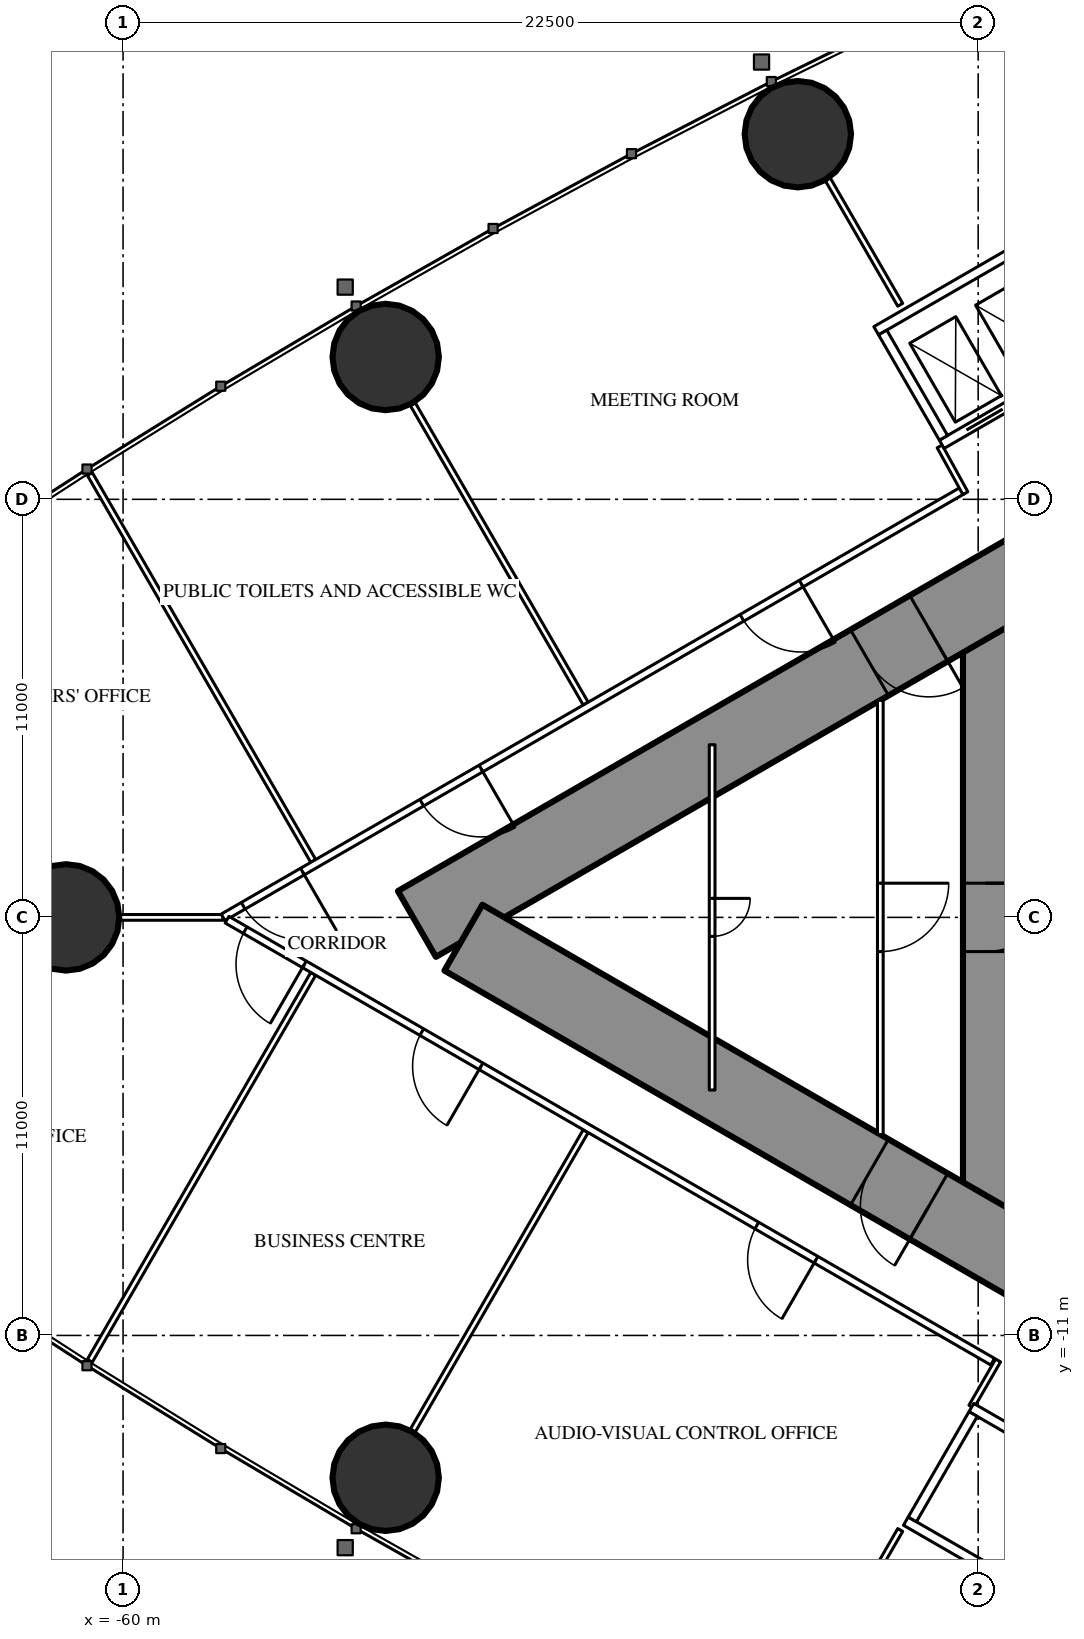
"""IFC4 building model, lengths in metres.
Left out: names, types, materials, properties, quantities, classifications, styles, units other than length and angle.
Written with IfcOpenShell. Run it as: python <this file> out.ifc"""

import sys

from ifc_helpers import new_model, si_unit, direction, frame, frame_2d, origin, origin_2d, place, context, subcontext, project, spatial, rectangle, hollow_circle, extrude, element, fill, save


model = new_model("IFC4")
c1 = context("Model", 3, precision=1e-05, world=origin(), true_north=direction((0.0, 1.0)))
c2 = subcontext(c1, "Body", "Model", "MODEL_VIEW")
j1 = project(units=[si_unit("LENGTHUNIT", "METRE"), si_unit("PLANEANGLEUNIT", "RADIAN")], contexts=[c1])
p1 = place(None, origin())
s1 = spatial("IfcSite", under=j1, at=p1, CompositionType="ELEMENT")
p2 = place(p1, origin())
s2 = spatial("IfcBuilding", under=s1, at=p2, CompositionType="ELEMENT")
p3 = place(p2, frame((0.0, 0.0, 7.2)))
s3 = spatial("IfcBuildingStorey", under=s2, at=p3, CompositionType="ELEMENT", Elevation=7.2)
for number, where, z_axis, x_axis in (
    (1, (-53.09, -14.745, 0.0), (0.0, 0.0, 1.0), (1.0, 0.0, 0.0)),
    (2, (-42.245, 20.607, 0.0), (0.0, 0.0, 1.0), (1.0, 0.0, 0.0)),
    (3, (-53.09, 14.745, 0.0), (0.0, 0.0, 1.0), (1.0, 0.0, 0.0)),
):
    element("IfcColumn", number, at=place(p3, frame(where, z_axis=z_axis, x_axis=x_axis)), inside=s3, PredefinedType="COLUMN", context=c2, shape_type="SweptSolid", body=[
        extrude(hollow_circle(Radius=1.4, WallThickness=0.12, at=origin_2d()), origin(), (0.0, 0.0, 1.0), 5.4),
    ])
p4 = place(p3, frame((-61.5, 0.0, 0.0), z_axis=(0.0, 0.0, 1.0), x_axis=(1.0, 0.0, 0.0)))
e4 = element("IfcColumn", 4, at=p4, inside=s3, PredefinedType="COLUMN", context=c2, shape_type="SweptSolid", body=[
    extrude(hollow_circle(Radius=1.4, WallThickness=0.1, at=origin_2d()), origin(), (0.0, 0.0, 1.0), 5.4),
])
p5 = place(p3, frame((-37.3, 8.6, 0.0), z_axis=(0.0, 0.0, 1.0), x_axis=(0.0, -1.0, 0.0)))
e5 = element("IfcWall", 5, at=p5, inside=s3, PredefinedType="SHEAR", context=c2, shape_type="SweptSolid", body=[
    extrude(rectangle(XDim=17.2, YDim=1.2, at=frame_2d((8.6, 0.0))), origin(), (0.0, 0.0, 1.0), 5.4),
])
p6 = place(p5, frame((7.7, 0.0, 0.0)))
e6 = element("IfcOpeningElement", 6, at=p6, cuts=e5, PredefinedType="OPENING", context=c2, shape_type="SweptSolid", body=[
    extrude(rectangle(XDim=1.8, YDim=2.2, at=frame_2d((0.9, 1.1))), frame((0.0, 0.61, 0.0), z_axis=(0.0, -1.0, 0.0), x_axis=(1.0, 0.0, 0.0)), (0.0, 0.0, 1.0), 1.22),
])
p7 = place(p3, frame((-27.2, 14.3, 0.0), z_axis=(0.0, 0.0, 1.0), x_axis=(-0.866026593062, -0.499997940104, 0.0)))
e7 = element("IfcWall", 7, at=p7, inside=s3, PredefinedType="SHEAR", context=c2, shape_type="SweptSolid", body=[
    extrude(rectangle(XDim=28.946, YDim=2.0, at=frame_2d((14.473, 0.0))), origin(), (0.0, 0.0, 1.0), 5.4),
])
p8 = place(p7, frame((4.6, 0.0, 0.0)))
e8 = element("IfcOpeningElement", 8, at=p8, cuts=e7, PredefinedType="OPENING", context=c2, shape_type="SweptSolid", body=[
    extrude(rectangle(XDim=1.0, YDim=2.2, at=frame_2d((0.5, 1.1))), frame((0.0, 1.01, 0.0), z_axis=(0.0, -1.0, 0.0), x_axis=(1.0, 0.0, 0.0)), (0.0, 0.0, 1.0), 2.02),
])
p9 = place(p7, frame((13.395, 0.0, 0.0)))
e9 = element("IfcOpeningElement", 9, at=p9, cuts=e7, PredefinedType="OPENING", context=c2, shape_type="SweptSolid", body=[
    extrude(rectangle(XDim=1.8, YDim=2.2, at=frame_2d((0.9, 1.1))), frame((0.0, 1.01, 0.0), z_axis=(0.0, -1.0, 0.0), x_axis=(1.0, 0.0, 0.0)), (0.0, 0.0, 1.0), 2.02),
])
p10 = place(p3, frame((-27.2, -14.3, 0.0), z_axis=(0.0, 0.0, 1.0), x_axis=(-0.866024044937, 0.500002353585, 0.0)))
e10 = element("IfcWall", 10, at=p10, inside=s3, PredefinedType="SHEAR", context=c2, shape_type="SweptSolid", body=[
    extrude(rectangle(XDim=27.533, YDim=2.0, at=frame_2d((13.767, 0.0))), origin(), (0.0, 0.0, 1.0), 5.4),
])
p11 = place(p10, frame((4.6, 0.0, 0.0)))
e11 = element("IfcOpeningElement", 11, at=p11, cuts=e10, PredefinedType="OPENING", context=c2, shape_type="SweptSolid", body=[
    extrude(rectangle(XDim=1.0, YDim=2.2, at=frame_2d((0.5, 1.1))), frame((0.0, 1.01, 0.0), z_axis=(0.0, -1.0, 0.0), x_axis=(1.0, 0.0, 0.0)), (0.0, 0.0, 1.0), 2.02),
])
p12 = place(p10, frame((13.395, 0.0, 0.0)))
e12 = element("IfcOpeningElement", 12, at=p12, cuts=e10, PredefinedType="OPENING", context=c2, shape_type="SweptSolid", body=[
    extrude(rectangle(XDim=1.8, YDim=2.2, at=frame_2d((0.9, 1.1))), frame((0.0, 1.01, 0.0), z_axis=(0.0, -1.0, 0.0), x_axis=(1.0, 0.0, 0.0)), (0.0, 0.0, 1.0), 2.02),
])
p13 = place(p3, frame((-47.827, 5.624, 0.0), z_axis=(0.0, 0.0, 1.0), x_axis=(-0.499995404498, 0.866028056982, 0.0)))
e13 = element("IfcWall", 13, at=p13, inside=s3, PredefinedType="PARTITIONING", context=c2, shape_type="SweptSolid", body=[
    extrude(rectangle(XDim=9.11, YDim=0.15, at=frame_2d((4.555, 0.0))), origin(), (0.0, 0.0, 1.0), 4.05),
])
p14 = place(p3, frame((-54.996, 1.485, 0.0), z_axis=(0.0, 0.0, 1.0), x_axis=(-0.500002871521, 0.866023745905, 0.0)))
e14 = element("IfcWall", 14, at=p14, inside=s3, PredefinedType="PARTITIONING", context=c2, shape_type="SweptSolid", body=[
    extrude(rectangle(XDim=11.757, YDim=0.15, at=frame_2d((5.878, 0.0))), origin(), (0.0, 0.0, 1.0), 5.05),
])
p15 = place(p3, frame((-47.827, -5.624, 0.0), z_axis=(0.0, 0.0, 1.0), x_axis=(-0.499995404498, -0.866028056982, 0.0)))
e15 = element("IfcWall", 15, at=p15, inside=s3, PredefinedType="PARTITIONING", context=c2, shape_type="SweptSolid", body=[
    extrude(rectangle(XDim=9.11, YDim=0.15, at=frame_2d((4.555, 0.0))), origin(), (0.0, 0.0, 1.0), 4.05),
])
p16 = place(p3, frame((-54.996, -1.485, 0.0), z_axis=(0.0, 0.0, 1.0), x_axis=(-0.500002871521, -0.866023745905, 0.0)))
e16 = element("IfcWall", 16, at=p16, inside=s3, PredefinedType="PARTITIONING", context=c2, shape_type="SweptSolid", body=[
    extrude(rectangle(XDim=11.757, YDim=0.15, at=frame_2d((5.878, 0.0))), origin(), (0.0, 0.0, 1.0), 5.05),
])
p17 = place(p3, frame((-57.368, 0.0, 0.0), z_axis=(0.0, 0.0, 1.0), x_axis=(-1.0, 0.0, 0.0)))
e17 = element("IfcWall", 17, at=p17, inside=s3, PredefinedType="PARTITIONING", context=c2, shape_type="SweptSolid", body=[
    extrude(rectangle(XDim=15.447, YDim=0.15, at=frame_2d((7.724, 0.0))), origin(), (0.0, 0.0, 1.0), 4.05),
])
for number, where, z_axis, x_axis in (
    (18, (-39.551, 16.119, 0.0), (0.0, 0.0, 1.0), (-0.5, 0.866, 0.0)),
    (19, (-39.551, -16.118, 0.0), (0.0, 0.0, 1.0), (-0.5, -0.866, 0.0)),
):
    element("IfcWall", number, at=place(p3, frame(where, z_axis=z_axis, x_axis=x_axis)), inside=s3, PredefinedType="PARTITIONING", context=c2, shape_type="SweptSolid", body=[
        extrude(rectangle(XDim=3.815, YDim=0.15, at=frame_2d((1.907, 0.0))), origin(), (0.0, 0.0, 1.0), 5.05),
    ])
p18 = place(p3, frame((-37.9, 11.24, 0.0), z_axis=(0.0, 0.0, 1.0), x_axis=(-0.866022995118, -0.50000417191, 0.0)))
e20 = element("IfcWall", 20, at=p18, inside=s3, PredefinedType="PARTITIONING", context=c2, shape_type="SweptSolid", body=[
    extrude(rectangle(XDim=22.48, YDim=0.2, at=frame_2d((11.24, 0.0))), origin(), (0.0, 0.0, 1.0), 5.05),
])
p19 = place(p18, frame((14.644, 0.0, 0.0)))
e21 = element("IfcOpeningElement", 21, at=p19, cuts=e20, PredefinedType="OPENING", context=c2, shape_type="SweptSolid", body=[
    extrude(rectangle(XDim=1.8, YDim=2.2, at=frame_2d((0.9, 1.1))), frame((0.0, 0.11, 0.0), z_axis=(0.0, -1.0, 0.0), x_axis=(1.0, 0.0, 0.0)), (0.0, 0.0, 1.0), 0.22),
])
p20 = place(p18, frame((20.069, 0.0, 0.0)))
e22 = element("IfcOpeningElement", 22, at=p20, cuts=e20, PredefinedType="OPENING", context=c2, shape_type="SweptSolid", body=[
    extrude(rectangle(XDim=1.8, YDim=2.2, at=frame_2d((0.9, 1.1))), frame((0.0, 0.11, 0.0), z_axis=(0.0, -1.0, 0.0), x_axis=(1.0, 0.0, 0.0)), (0.0, 0.0, 1.0), 0.22),
])
p21 = place(p18, frame((4.915, 0.0, 0.0)))
e23 = element("IfcOpeningElement", 23, at=p21, cuts=e20, PredefinedType="OPENING", context=c2, shape_type="SweptSolid", body=[
    extrude(rectangle(XDim=1.8, YDim=2.2, at=frame_2d((0.9, 1.1))), frame((0.0, 0.11, 0.0), z_axis=(0.0, -1.0, 0.0), x_axis=(1.0, 0.0, 0.0)), (0.0, 0.0, 1.0), 0.22),
])
p22 = place(p3, frame((-37.12, -11.69, 0.0), z_axis=(0.0, 0.0, 1.0), x_axis=(-0.866028803602, 0.499994111297, 0.0)))
e24 = element("IfcWall", 24, at=p22, inside=s3, PredefinedType="PARTITIONING", context=c2, shape_type="SweptSolid", body=[
    extrude(rectangle(XDim=23.26, YDim=0.2, at=frame_2d((11.63, 0.0))), origin(), (0.0, 0.0, 1.0), 5.05),
])
p23 = place(p22, frame((20.909, 0.0, 0.0)))
e25 = element("IfcOpeningElement", 25, at=p23, cuts=e24, PredefinedType="OPENING", context=c2, shape_type="SweptSolid", body=[
    extrude(rectangle(XDim=1.8, YDim=2.2, at=frame_2d((0.9, 1.1))), frame((0.0, 0.11, 0.0), z_axis=(0.0, -1.0, 0.0), x_axis=(1.0, 0.0, 0.0)), (0.0, 0.0, 1.0), 0.22),
])
p24 = place(p22, frame((15.544, 0.0, 0.0)))
e26 = element("IfcOpeningElement", 26, at=p24, cuts=e24, PredefinedType="OPENING", context=c2, shape_type="SweptSolid", body=[
    extrude(rectangle(XDim=1.8, YDim=2.2, at=frame_2d((0.9, 1.1))), frame((0.0, 0.11, 0.0), z_axis=(0.0, -1.0, 0.0), x_axis=(1.0, 0.0, 0.0)), (0.0, 0.0, 1.0), 0.22),
])
p25 = place(p22, frame((5.365, 0.0, 0.0)))
e27 = element("IfcOpeningElement", 27, at=p25, cuts=e24, PredefinedType="OPENING", context=c2, shape_type="SweptSolid", body=[
    extrude(rectangle(XDim=1.8, YDim=2.2, at=frame_2d((0.9, 1.1))), frame((0.0, 0.11, 0.0), z_axis=(0.0, -1.0, 0.0), x_axis=(1.0, 0.0, 0.0)), (0.0, 0.0, 1.0), 0.22),
])
p26 = place(p3, frame((-36.976, -11.658, 0.0), z_axis=(0.0, 0.0, 1.0), x_axis=(-0.50008355685, -0.86597715684, 0.0)))
e28 = element("IfcWall", 28, at=p26, inside=s3, PredefinedType="PARTITIONING", context=c2, shape_type="SweptSolid", body=[
    extrude(rectangle(XDim=1.405, YDim=0.15, at=frame_2d((0.702, 0.0))), origin(), (0.0, 0.0, 1.0), 5.05),
])
p27 = place(p3, frame((-38.513, 12.392, 0.0), z_axis=(0.0, 0.0, 1.0), x_axis=(0.481358300093, -0.876523922624, 0.0)))
e29 = element("IfcWall", 29, at=p27, inside=s3, PredefinedType="PARTITIONING", context=c2, shape_type="SweptSolid", body=[
    extrude(rectangle(XDim=1.405, YDim=0.15, at=frame_2d((0.703, 0.0))), origin(), (0.0, 0.0, 1.0), 5.05),
])
p28 = place(p3, frame((-40.075, 5.712, 0.0), z_axis=(0.0, 0.0, 1.0), x_axis=(0.0, -1.0, 0.0)))
e30 = element("IfcWall", 30, at=p28, inside=s3, PredefinedType="PARTITIONING", context=c2, shape_type="SweptSolid", body=[
    extrude(rectangle(XDim=11.424, YDim=0.15, at=frame_2d((5.712, 0.0))), origin(), (0.0, 0.0, 1.0), 5.05),
])
p29 = place(p28, frame((4.812, 0.0, 0.0)))
e31 = element("IfcOpeningElement", 31, at=p29, cuts=e30, PredefinedType="OPENING", context=c2, shape_type="SweptSolid", body=[
    extrude(rectangle(XDim=1.8, YDim=2.2, at=frame_2d((0.9, 1.1))), frame((0.0, 0.085, 0.0), z_axis=(0.0, -1.0, 0.0), x_axis=(1.0, 0.0, 0.0)), (0.0, 0.0, 1.0), 0.17),
])
p30 = place(p3, frame((-44.5, 4.543, 0.0), z_axis=(0.0, 0.0, 1.0), x_axis=(0.0, -1.0, 0.0)))
e32 = element("IfcWall", 32, at=p30, inside=s3, PredefinedType="PARTITIONING", context=c2, shape_type="SweptSolid", body=[
    extrude(rectangle(XDim=9.085, YDim=0.15, at=frame_2d((4.543, 0.0))), origin(), (0.0, 0.0, 1.0), 5.05),
])
p31 = place(p30, frame((4.043, 0.0, 0.0)))
e33 = element("IfcOpeningElement", 33, at=p31, cuts=e32, PredefinedType="OPENING", context=c2, shape_type="SweptSolid", body=[
    extrude(rectangle(XDim=1.0, YDim=2.2, at=frame_2d((0.5, 1.1))), frame((0.0, 0.085, 0.0), z_axis=(0.0, -1.0, 0.0), x_axis=(1.0, 0.0, 0.0)), (0.0, 0.0, 1.0), 0.17),
])
p32 = place(p3, frame((-31.01, 16.747, 0.0), z_axis=(0.0, 0.0, 1.0), x_axis=(-0.866028165386, -0.499995216735, 0.0)))
e34 = element("IfcWall", 34, at=p32, inside=s3, PredefinedType="PARTITIONING", context=c2, shape_type="SweptSolid", body=[
    extrude(rectangle(XDim=8.6, YDim=0.25, at=frame_2d((4.3, 0.0))), origin(), (0.0, 0.0, 1.0), 5.05),
])
p33 = place(p32, frame((0.75, 0.0, 0.0)))
e35 = element("IfcOpeningElement", 35, at=p33, cuts=e34, PredefinedType="OPENING", context=c2, shape_type="SweptSolid", body=[
    extrude(rectangle(XDim=1.1, YDim=2.2, at=frame_2d((0.55, 1.1))), frame((0.0, 0.135, 0.0), z_axis=(0.0, -1.0, 0.0), x_axis=(1.0, 0.0, 0.0)), (0.0, 0.0, 1.0), 0.27),
])
p34 = place(p32, frame((2.75, 0.0, 0.0)))
e36 = element("IfcOpeningElement", 36, at=p34, cuts=e34, PredefinedType="OPENING", context=c2, shape_type="SweptSolid", body=[
    extrude(rectangle(XDim=1.1, YDim=2.2, at=frame_2d((0.55, 1.1))), frame((0.0, 0.135, 0.0), z_axis=(0.0, -1.0, 0.0), x_axis=(1.0, 0.0, 0.0)), (0.0, 0.0, 1.0), 0.27),
])
p35 = place(p32, frame((4.75, 0.0, 0.0)))
e37 = element("IfcOpeningElement", 37, at=p35, cuts=e34, PredefinedType="OPENING", context=c2, shape_type="SweptSolid", body=[
    extrude(rectangle(XDim=1.1, YDim=2.2, at=frame_2d((0.55, 1.1))), frame((0.0, 0.135, 0.0), z_axis=(0.0, -1.0, 0.0), x_axis=(1.0, 0.0, 0.0)), (0.0, 0.0, 1.0), 0.27),
])
p36 = place(p32, frame((6.75, 0.0, 0.0)))
e38 = element("IfcOpeningElement", 38, at=p36, cuts=e34, PredefinedType="OPENING", context=c2, shape_type="SweptSolid", body=[
    extrude(rectangle(XDim=1.1, YDim=2.2, at=frame_2d((0.55, 1.1))), frame((0.0, 0.135, 0.0), z_axis=(0.0, -1.0, 0.0), x_axis=(1.0, 0.0, 0.0)), (0.0, 0.0, 1.0), 0.27),
])
p37 = place(p3, frame((-32.736, 19.736, 0.0), z_axis=(0.0, 0.0, 1.0), x_axis=(-0.866028165386, -0.499995216735, 0.0)))
e39 = element("IfcWall", 39, at=p37, inside=s3, PredefinedType="PARTITIONING", context=c2, shape_type="SweptSolid", body=[
    extrude(rectangle(XDim=8.6, YDim=0.25, at=frame_2d((4.3, 0.0))), origin(), (0.0, 0.0, 1.0), 5.05),
])
p38 = place(p3, frame((-38.413, 12.618, 0.0), z_axis=(0.0, 0.0, 1.0), x_axis=(-0.499872130319, 0.866099216793, 0.0)))
e40 = element("IfcWall", 40, at=p38, inside=s3, PredefinedType="PARTITIONING", context=c2, shape_type="SweptSolid", body=[
    extrude(rectangle(XDim=3.2, YDim=0.25, at=frame_2d((1.6, 0.0))), origin(), (0.0, 0.0, 1.0), 5.05),
])
p39 = place(p3, frame((-33.696, -15.197, 0.0), z_axis=(0.0, 0.0, 1.0), x_axis=(-0.865976953817, 0.500083908417, 0.0)))
e41 = element("IfcWall", 41, at=p39, inside=s3, PredefinedType="PARTITIONING", context=c2, shape_type="SweptSolid", body=[
    extrude(rectangle(XDim=4.599, YDim=0.25, at=frame_2d((2.3, 0.0))), origin(), (0.0, 0.0, 1.0), 5.05),
])
p40 = place(p3, frame((-35.42, -18.186, 0.0), z_axis=(0.0, 0.0, 1.0), x_axis=(-0.865990227814, 0.50006092162, 0.0)))
e42 = element("IfcWall", 42, at=p40, inside=s3, PredefinedType="PARTITIONING", context=c2, shape_type="SweptSolid", body=[
    extrude(rectangle(XDim=4.6, YDim=0.25, at=frame_2d((2.3, 0.0))), origin(), (0.0, 0.0, 1.0), 5.05),
])
p41 = place(p3, frame((-37.633, -13.068, 0.0), z_axis=(0.0, 0.0, 1.0), x_axis=(-0.499872130319, -0.866099216793, 0.0)))
e43 = element("IfcWall", 43, at=p41, inside=s3, PredefinedType="PARTITIONING", context=c2, shape_type="SweptSolid", body=[
    extrude(rectangle(XDim=3.2, YDim=0.25, at=frame_2d((1.6, 0.0))), origin(), (0.0, 0.0, 1.0), 5.05),
])
p42 = place(p19, origin())
e44 = element("IfcDoor", 44, at=p42, inside=s3, OperationType="DOUBLE_DOOR_SINGLE_SWING", PredefinedType="DOOR", context=c2, shape_type="SweptSolid", body=[
    extrude(rectangle(XDim=1.8, YDim=2.2, at=frame_2d((0.9, 1.1))), frame((0.0, 0.025, 0.0), z_axis=(0.0, -1.0, 0.0), x_axis=(1.0, 0.0, 0.0)), (0.0, 0.0, 1.0), 0.05),
])
fill(e21, e44)
p43 = place(p20, origin())
e45 = element("IfcDoor", 45, at=p43, inside=s3, OperationType="DOUBLE_DOOR_SINGLE_SWING", PredefinedType="DOOR", context=c2, shape_type="SweptSolid", body=[
    extrude(rectangle(XDim=1.8, YDim=2.2, at=frame_2d((0.9, 1.1))), frame((0.0, 0.025, 0.0), z_axis=(0.0, -1.0, 0.0), x_axis=(1.0, 0.0, 0.0)), (0.0, 0.0, 1.0), 0.05),
])
fill(e22, e45)
p44 = place(p23, origin())
e46 = element("IfcDoor", 46, at=p44, inside=s3, OperationType="DOUBLE_DOOR_SINGLE_SWING", PredefinedType="DOOR", context=c2, shape_type="SweptSolid", body=[
    extrude(rectangle(XDim=1.8, YDim=2.2, at=frame_2d((0.9, 1.1))), frame((0.0, 0.025, 0.0), z_axis=(0.0, -1.0, 0.0), x_axis=(1.0, 0.0, 0.0)), (0.0, 0.0, 1.0), 0.05),
])
fill(e25, e46)
p45 = place(p24, origin())
e47 = element("IfcDoor", 47, at=p45, inside=s3, OperationType="DOUBLE_DOOR_SINGLE_SWING", PredefinedType="DOOR", context=c2, shape_type="SweptSolid", body=[
    extrude(rectangle(XDim=1.8, YDim=2.2, at=frame_2d((0.9, 1.1))), frame((0.0, 0.025, 0.0), z_axis=(0.0, -1.0, 0.0), x_axis=(1.0, 0.0, 0.0)), (0.0, 0.0, 1.0), 0.05),
])
fill(e26, e47)
p46 = place(p25, origin())
e48 = element("IfcDoor", 48, at=p46, inside=s3, OperationType="DOUBLE_DOOR_SINGLE_SWING", PredefinedType="DOOR", context=c2, shape_type="SweptSolid", body=[
    extrude(rectangle(XDim=1.8, YDim=2.2, at=frame_2d((0.9, 1.1))), frame((0.0, 0.025, 0.0), z_axis=(0.0, -1.0, 0.0), x_axis=(1.0, 0.0, 0.0)), (0.0, 0.0, 1.0), 0.05),
])
fill(e27, e48)
p47 = place(p21, origin())
e49 = element("IfcDoor", 49, at=p47, inside=s3, OperationType="DOUBLE_DOOR_SINGLE_SWING", PredefinedType="DOOR", context=c2, shape_type="SweptSolid", body=[
    extrude(rectangle(XDim=1.8, YDim=2.2, at=frame_2d((0.9, 1.1))), frame((0.0, 0.025, 0.0), z_axis=(0.0, -1.0, 0.0), x_axis=(1.0, 0.0, 0.0)), (0.0, 0.0, 1.0), 0.05),
])
fill(e23, e49)
p48 = place(p29, origin())
e50 = element("IfcDoor", 50, at=p48, inside=s3, OperationType="DOUBLE_DOOR_SINGLE_SWING", PredefinedType="DOOR", context=c2, shape_type="SweptSolid", body=[
    extrude(rectangle(XDim=1.8, YDim=2.2, at=frame_2d((0.9, 1.1))), frame((0.0, 0.025, 0.0), z_axis=(0.0, -1.0, 0.0), x_axis=(1.0, 0.0, 0.0)), (0.0, 0.0, 1.0), 0.05),
])
fill(e31, e50)
p49 = place(p31, origin())
e51 = element("IfcDoor", 51, at=p49, inside=s3, OperationType="SINGLE_SWING_LEFT", PredefinedType="DOOR", context=c2, shape_type="SweptSolid", body=[
    extrude(rectangle(XDim=1.0, YDim=2.2, at=frame_2d((0.5, 1.1))), frame((0.0, 0.025, 0.0), z_axis=(0.0, -1.0, 0.0), x_axis=(1.0, 0.0, 0.0)), (0.0, 0.0, 1.0), 0.05),
])
fill(e33, e51)
p50 = place(p9, origin())
e52 = element("IfcDoor", 52, at=p50, inside=s3, OperationType="DOUBLE_DOOR_SINGLE_SWING", PredefinedType="DOOR", context=c2, shape_type="SweptSolid", body=[
    extrude(rectangle(XDim=1.8, YDim=2.2, at=frame_2d((0.9, 1.1))), frame((0.0, 0.025, 0.0), z_axis=(0.0, -1.0, 0.0), x_axis=(1.0, 0.0, 0.0)), (0.0, 0.0, 1.0), 0.05),
])
fill(e9, e52)
p51 = place(p12, origin())
e53 = element("IfcDoor", 53, at=p51, inside=s3, OperationType="DOUBLE_DOOR_SINGLE_SWING", PredefinedType="DOOR", context=c2, shape_type="SweptSolid", body=[
    extrude(rectangle(XDim=1.8, YDim=2.2, at=frame_2d((0.9, 1.1))), frame((0.0, 0.025, 0.0), z_axis=(0.0, -1.0, 0.0), x_axis=(1.0, 0.0, 0.0)), (0.0, 0.0, 1.0), 0.05),
])
fill(e12, e53)
p52 = place(p6, origin())
e54 = element("IfcDoor", 54, at=p52, inside=s3, OperationType="DOUBLE_DOOR_SINGLE_SWING", PredefinedType="DOOR", context=c2, shape_type="SweptSolid", body=[
    extrude(rectangle(XDim=1.8, YDim=2.2, at=frame_2d((0.9, 1.1))), frame((0.0, 0.025, 0.0), z_axis=(0.0, -1.0, 0.0), x_axis=(1.0, 0.0, 0.0)), (0.0, 0.0, 1.0), 0.05),
])
fill(e6, e54)
p53 = place(p36, origin())
e55 = element("IfcDoor", 55, at=p53, inside=s3, OperationType="DOUBLE_DOOR_SLIDING", PredefinedType="USERDEFINED", context=c2, shape_type="SweptSolid", body=[
    extrude(rectangle(XDim=1.1, YDim=2.2, at=frame_2d((0.55, 1.1))), frame((0.0, 0.025, 0.0), z_axis=(0.0, -1.0, 0.0), x_axis=(1.0, 0.0, 0.0)), (0.0, 0.0, 1.0), 0.05),
])
fill(e38, e55)
save(model, sys.argv[1])
